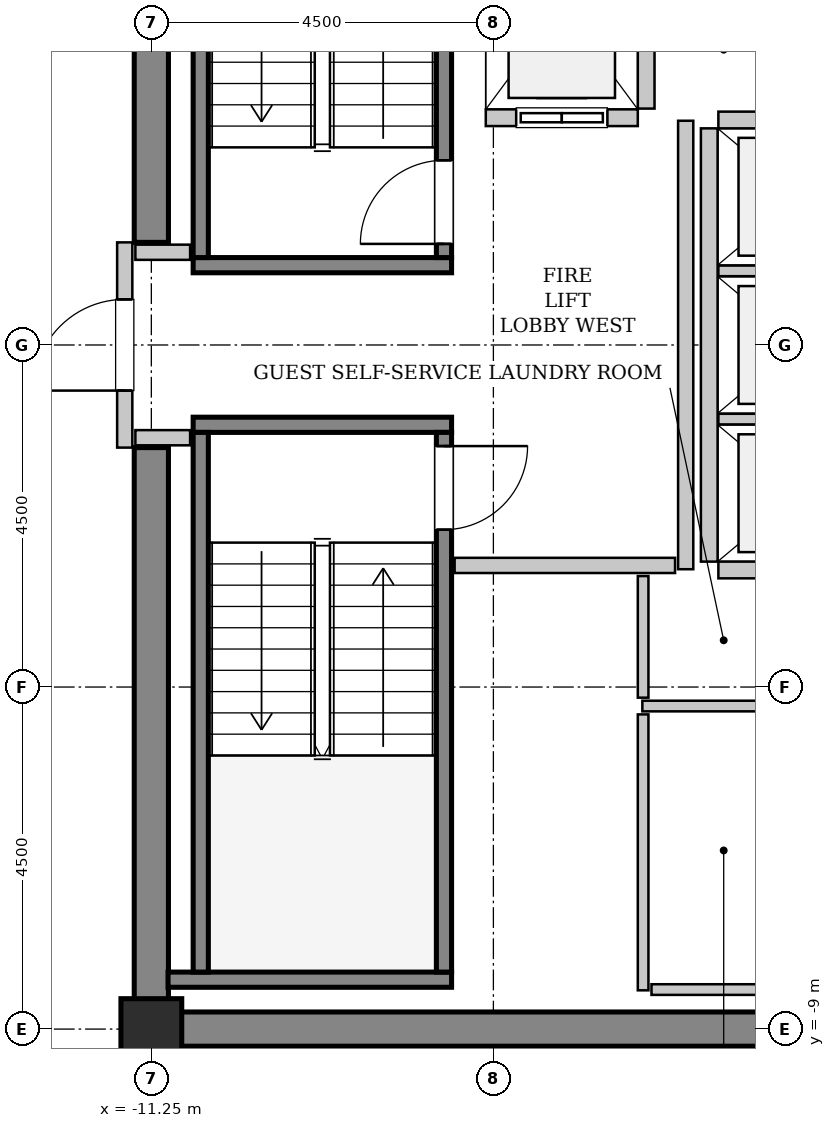
"""IFC4 building model, lengths in metres.
Left out: names, types, materials, properties, quantities, classifications, styles, units other than length and angle.
Written with IfcOpenShell. Run it as: python <this file> out.ifc"""

import sys

from ifc_helpers import new_model, si_unit, direction, frame, frame_2d, origin, origin_2d, place, context, subcontext, project, spatial, rectangle, hollow_rectangle, extrude, source, transform, mapped, element, fill, save


model = new_model("IFC4")
c1 = context("Model", 3, precision=1e-05, world=origin(), true_north=direction((0.0, 1.0)))
c2 = subcontext(c1, "Body", "Model", "MODEL_VIEW")
j1 = project(units=[si_unit("LENGTHUNIT", "METRE"), si_unit("PLANEANGLEUNIT", "RADIAN")], contexts=[c1])
p1 = place(None, origin())
s1 = spatial("IfcSite", under=j1, at=p1, CompositionType="ELEMENT")
p2 = place(p1, origin())
s2 = spatial("IfcBuilding", under=s1, at=p2, CompositionType="ELEMENT")
p3 = place(p2, frame((0.0, 0.0, 298.8)))
s3 = spatial("IfcBuildingStorey", under=s2, at=p3, CompositionType="ELEMENT", Elevation=298.8)
m1 = source(origin(), c2, "Body", "SweptSolid", [
    extrude(rectangle(XDim=9.925, YDim=0.45, at=frame_2d((4.962, 0.0))), origin(), (0.0, 0.0, 1.0), 3.8),
])
p4 = place(p3, frame((-11.475, -9.0, 0.0), z_axis=(0.0, 0.0, 1.0), x_axis=(1.0, 0.0, 0.0)))
e1 = element("IfcWall", 1, at=p4, inside=s3, PredefinedType="SHEAR", context=c2, shape_type="MappedRepresentation", body=[
    mapped(m1, transform((0.0, 0.0, 0.0), x_axis=(1.0, 0.0, 0.0), y_axis=(0.0, 1.0, 0.0), z_axis=(0.0, 0.0, 1.0), scale=1.0)),
])
m2 = source(origin(), c2, "Body", "SweptSolid", [
    extrude(rectangle(XDim=7.425, YDim=0.45, at=frame_2d((3.712, 0.0))), origin(), (0.0, 0.0, 1.0), 3.8),
])
for number, where, z_axis, x_axis in (
    (2, (-11.25, -8.775, 0.0), (0.0, 0.0, 1.0), (0.0, 1.0, 0.0)),
    (3, (-11.25, 1.35, 0.0), (0.0, 0.0, 1.0), (0.0, 1.0, 0.0)),
):
    element("IfcWall", number, at=place(p3, frame(where, z_axis=z_axis, x_axis=x_axis)), inside=s3, PredefinedType="SHEAR", context=c2, shape_type="MappedRepresentation", body=[
        mapped(m2, transform((0.0, 0.0, 0.0), x_axis=(1.0, 0.0, 0.0), y_axis=(0.0, 1.0, 0.0), z_axis=(0.0, 0.0, 1.0), scale=1.0)),
    ])
m3 = source(origin(), c2, "Body", "SweptSolid", [
    extrude(hollow_rectangle(XDim=0.8, YDim=0.8, WallThickness=0.04, InnerFilletRadius=0.04, OuterFilletRadius=0.08, at=origin_2d()), origin(), (0.0, 0.0, 1.0), 3.8),
])
p5 = place(p3, frame((-11.25, -9.0, 0.0), z_axis=(0.0, 0.0, 1.0), x_axis=(1.0, 0.0, 0.0)))
e4 = element("IfcColumn", 4, at=p5, inside=s3, PredefinedType="COLUMN", context=c2, shape_type="MappedRepresentation", body=[
    mapped(m3, transform((0.0, 0.0, 0.0), x_axis=(1.0, 0.0, 0.0), y_axis=(0.0, 1.0, 0.0), z_axis=(0.0, 0.0, 1.0), scale=1.0)),
])
m4 = source(origin(), c2, "Body", "SweptSolid", [
    extrude(rectangle(XDim=3.4, YDim=0.2, at=frame_2d((1.7, 0.0))), origin(), (0.0, 0.0, 1.0), 3.8),
])
p6 = place(p3, frame((-7.3, 1.05, 0.0), z_axis=(0.0, 0.0, 1.0), x_axis=(-1.0, 0.0, 0.0)))
e5 = element("IfcWall", 5, at=p6, inside=s3, PredefinedType="SOLIDWALL", context=c2, shape_type="MappedRepresentation", body=[
    mapped(m4, transform((0.0, 0.0, 0.0), x_axis=(1.0, 0.0, 0.0), y_axis=(0.0, 1.0, 0.0), z_axis=(0.0, 0.0, 1.0), scale=1.0)),
])
m5 = source(origin(), c2, "Body", "SweptSolid", [
    extrude(rectangle(XDim=7.1, YDim=0.2, at=frame_2d((3.55, 0.0))), origin(), (0.0, 0.0, 1.0), 3.8),
])
p7 = place(p3, frame((-7.4, 1.15, 0.0), z_axis=(0.0, 0.0, 1.0), x_axis=(0.0, 1.0, 0.0)))
e6 = element("IfcWall", 6, at=p7, inside=s3, PredefinedType="SOLIDWALL", context=c2, shape_type="MappedRepresentation", body=[
    mapped(m5, transform((0.0, 0.0, 0.0), x_axis=(1.0, 0.0, 0.0), y_axis=(0.0, 1.0, 0.0), z_axis=(0.0, 0.0, 1.0), scale=1.0)),
])
p8 = place(p7, frame((0.18, 0.0, 0.0)))
e7 = element("IfcOpeningElement", 7, at=p8, cuts=e6, PredefinedType="OPENING", context=c2, shape_type="SweptSolid", body=[
    extrude(rectangle(XDim=1.1, YDim=2.15, at=frame_2d((0.55, 1.075))), frame((0.0, 0.11, 0.0), z_axis=(0.0, -1.0, 0.0), x_axis=(1.0, 0.0, 0.0)), (0.0, 0.0, 1.0), 0.22),
])
p9 = place(p3, frame((-10.6, 1.15, 0.0), z_axis=(0.0, 0.0, 1.0), x_axis=(0.0, 1.0, 0.0)))
e8 = element("IfcWall", 8, at=p9, inside=s3, PredefinedType="SOLIDWALL", context=c2, shape_type="MappedRepresentation", body=[
    mapped(m5, transform((0.0, 0.0, 0.0), x_axis=(1.0, 0.0, 0.0), y_axis=(0.0, 1.0, 0.0), z_axis=(0.0, 0.0, 1.0), scale=1.0)),
])
p10 = place(p3, frame((-10.7, -1.05, 0.0), z_axis=(0.0, 0.0, 1.0), x_axis=(1.0, 0.0, 0.0)))
e9 = element("IfcWall", 9, at=p10, inside=s3, PredefinedType="SOLIDWALL", context=c2, shape_type="MappedRepresentation", body=[
    mapped(m4, transform((0.0, 0.0, 0.0), x_axis=(1.0, 0.0, 0.0), y_axis=(0.0, 1.0, 0.0), z_axis=(0.0, 0.0, 1.0), scale=1.0)),
])
m6 = source(origin(), c2, "Body", "SweptSolid", [
    extrude(rectangle(XDim=3.73, YDim=0.2, at=frame_2d((1.865, 0.0))), origin(), (0.0, 0.0, 1.0), 3.8),
])
p11 = place(p3, frame((-11.03, -8.35, 0.0), z_axis=(0.0, 0.0, 1.0), x_axis=(1.0, 0.0, 0.0)))
e10 = element("IfcWall", 10, at=p11, inside=s3, PredefinedType="SOLIDWALL", context=c2, shape_type="MappedRepresentation", body=[
    mapped(m6, transform((0.0, 0.0, 0.0), x_axis=(1.0, 0.0, 0.0), y_axis=(0.0, 1.0, 0.0), z_axis=(0.0, 0.0, 1.0), scale=1.0)),
])
p12 = place(p3, frame((-10.6, -1.15, 0.0), z_axis=(0.0, 0.0, 1.0), x_axis=(0.0, -1.0, 0.0)))
e11 = element("IfcWall", 11, at=p12, inside=s3, PredefinedType="SOLIDWALL", context=c2, shape_type="MappedRepresentation", body=[
    mapped(m5, transform((0.0, 0.0, 0.0), x_axis=(1.0, 0.0, 0.0), y_axis=(0.0, 1.0, 0.0), z_axis=(0.0, 0.0, 1.0), scale=1.0)),
])
p13 = place(p3, frame((-7.4, -1.15, 0.0), z_axis=(0.0, 0.0, 1.0), x_axis=(0.0, -1.0, 0.0)))
e12 = element("IfcWall", 12, at=p13, inside=s3, PredefinedType="SOLIDWALL", context=c2, shape_type="MappedRepresentation", body=[
    mapped(m5, transform((0.0, 0.0, 0.0), x_axis=(1.0, 0.0, 0.0), y_axis=(0.0, 1.0, 0.0), z_axis=(0.0, 0.0, 1.0), scale=1.0)),
])
p14 = place(p13, frame((0.18, 0.0, 0.0)))
e13 = element("IfcOpeningElement", 13, at=p14, cuts=e12, PredefinedType="OPENING", context=c2, shape_type="SweptSolid", body=[
    extrude(rectangle(XDim=1.1, YDim=2.15, at=frame_2d((0.55, 1.075))), frame((0.0, 0.11, 0.0), z_axis=(0.0, -1.0, 0.0), x_axis=(1.0, 0.0, 0.0)), (0.0, 0.0, 1.0), 0.22),
])
m7 = source(origin(), c2, "Body", "SweptSolid", [
    extrude(rectangle(XDim=2.0, YDim=0.22, at=frame_2d((1.0, 0.0))), origin(), (0.0, 0.0, 1.0), 3.535),
])
p15 = place(p3, frame((-6.85, 2.99, 0.0), z_axis=(0.0, 0.0, 1.0), x_axis=(1.0, 0.0, 0.0)))
e14 = element("IfcWall", 14, at=p15, inside=s3, PredefinedType="SOLIDWALL", context=c2, shape_type="MappedRepresentation", body=[
    mapped(m7, transform((0.0, 0.0, 0.0), x_axis=(1.0, 0.0, 0.0), y_axis=(0.0, 1.0, 0.0), z_axis=(0.0, 0.0, 1.0), scale=1.0)),
])
p16 = place(p15, frame((0.4, 0.0, 0.0)))
e15 = element("IfcOpeningElement", 15, at=p16, cuts=e14, PredefinedType="OPENING", context=c2, shape_type="SweptSolid", body=[
    extrude(rectangle(XDim=1.2, YDim=2.2, at=frame_2d((0.6, 1.1))), frame((0.0, 0.12, 0.0), z_axis=(0.0, -1.0, 0.0), x_axis=(1.0, 0.0, 0.0)), (0.0, 0.0, 1.0), 0.24),
])
m8 = source(origin(), c2, "Body", "SweptSolid", [
    extrude(rectangle(XDim=2.68, YDim=0.22, at=frame_2d((1.34, 0.0))), origin(), (0.0, 0.0, 1.0), 3.535),
])
p17 = place(p3, frame((-4.74, 3.11, 0.0), z_axis=(0.0, 0.0, 1.0), x_axis=(0.0, 1.0, 0.0)))
e16 = element("IfcWall", 16, at=p17, inside=s3, PredefinedType="SOLIDWALL", context=c2, shape_type="MappedRepresentation", body=[
    mapped(m8, transform((0.0, 0.0, 0.0), x_axis=(1.0, 0.0, 0.0), y_axis=(0.0, 1.0, 0.0), z_axis=(0.0, 0.0, 1.0), scale=1.0)),
])
m9 = source(origin(), c2, "Body", "SweptSolid", [
    extrude(rectangle(XDim=5.7, YDim=0.22, at=frame_2d((2.85, 0.0))), origin(), (0.0, 0.0, 1.0), 3.535),
])
p18 = place(p3, frame((-3.91, 2.85, 0.0), z_axis=(0.0, 0.0, 1.0), x_axis=(0.0, -1.0, 0.0)))
e17 = element("IfcWall", 17, at=p18, inside=s3, PredefinedType="SOLIDWALL", context=c2, shape_type="MappedRepresentation", body=[
    mapped(m9, transform((0.0, 0.0, 0.0), x_axis=(1.0, 0.0, 0.0), y_axis=(0.0, 1.0, 0.0), z_axis=(0.0, 0.0, 1.0), scale=1.0)),
])
m10 = source(origin(), c2, "Body", "SweptSolid", [
    extrude(rectangle(XDim=2.13, YDim=0.22, at=frame_2d((1.065, 0.0))), origin(), (0.0, 0.0, 1.0), 3.535),
])
p19 = place(p3, frame((-3.79, -2.96, 0.0), z_axis=(0.0, 0.0, 1.0), x_axis=(1.0, 0.0, 0.0)))
e18 = element("IfcWall", 18, at=p19, inside=s3, PredefinedType="SOLIDWALL", context=c2, shape_type="MappedRepresentation", body=[
    mapped(m10, transform((0.0, 0.0, 0.0), x_axis=(1.0, 0.0, 0.0), y_axis=(0.0, 1.0, 0.0), z_axis=(0.0, 0.0, 1.0), scale=1.0)),
])
m11 = source(origin(), c2, "Body", "SweptSolid", [
    extrude(rectangle(XDim=2.13, YDim=0.14, at=frame_2d((1.065, 0.0))), origin(), (0.0, 0.0, 1.0), 3.535),
])
for number, where, z_axis, x_axis in (
    (19, (-3.79, -0.975, 0.0), (0.0, 0.0, 1.0), (1.0, 0.0, 0.0)),
    (20, (-3.79, 0.975, 0.0), (0.0, 0.0, 1.0), (1.0, 0.0, 0.0)),
):
    element("IfcWall", number, at=place(p3, frame(where, z_axis=z_axis, x_axis=x_axis)), inside=s3, PredefinedType="PARTITIONING", context=c2, shape_type="MappedRepresentation", body=[
        mapped(m11, transform((0.0, 0.0, 0.0), x_axis=(1.0, 0.0, 0.0), y_axis=(0.0, 1.0, 0.0), z_axis=(0.0, 0.0, 1.0), scale=1.0)),
    ])
p20 = place(p3, frame((-1.66, 2.96, 0.0), z_axis=(0.0, 0.0, 1.0), x_axis=(-1.0, 0.0, 0.0)))
e21 = element("IfcWall", 21, at=p20, inside=s3, PredefinedType="SOLIDWALL", context=c2, shape_type="MappedRepresentation", body=[
    mapped(m10, transform((0.0, 0.0, 0.0), x_axis=(1.0, 0.0, 0.0), y_axis=(0.0, 1.0, 0.0), z_axis=(0.0, 0.0, 1.0), scale=1.0)),
])
m12 = source(origin(), c2, "Body", "SweptSolid", [
    extrude(rectangle(XDim=2.7, YDim=0.2, at=frame_2d((1.35, 0.0))), origin(), (0.0, 0.0, 1.0), 2.625),
])
p21 = place(p3, frame((-11.6, -1.35, 0.0), z_axis=(0.0, 0.0, 1.0), x_axis=(0.0, 1.0, 0.0)))
e22 = element("IfcWall", 22, at=p21, inside=s3, PredefinedType="PARTITIONING", context=c2, shape_type="MappedRepresentation", body=[
    mapped(m12, transform((0.0, 0.0, 0.0), x_axis=(1.0, 0.0, 0.0), y_axis=(0.0, 1.0, 0.0), z_axis=(0.0, 0.0, 1.0), scale=1.0)),
])
p22 = place(p21, frame((0.75, 0.0, 0.0)))
e23 = element("IfcOpeningElement", 23, at=p22, cuts=e22, PredefinedType="OPENING", context=c2, shape_type="SweptSolid", body=[
    extrude(rectangle(XDim=1.2, YDim=2.15, at=frame_2d((0.6, 1.075))), frame((0.0, 0.11, 0.0), z_axis=(0.0, -1.0, 0.0), x_axis=(1.0, 0.0, 0.0)), (0.0, 0.0, 1.0), 0.22),
])
m13 = source(origin(), c2, "Body", "SweptSolid", [
    extrude(rectangle(XDim=5.9, YDim=0.2, at=frame_2d((2.95, 0.0))), origin(), (0.0, 0.0, 1.0), 3.535),
])
p23 = place(p3, frame((-4.22, -2.95, 0.0), z_axis=(0.0, 0.0, 1.0), x_axis=(0.0, 1.0, 0.0)))
e24 = element("IfcWall", 24, at=p23, inside=s3, PredefinedType="PARTITIONING", context=c2, shape_type="MappedRepresentation", body=[
    mapped(m13, transform((0.0, 0.0, 0.0), x_axis=(1.0, 0.0, 0.0), y_axis=(0.0, 1.0, 0.0), z_axis=(0.0, 0.0, 1.0), scale=1.0)),
])
m14 = source(origin(), c2, "Body", "SweptSolid", [
    extrude(rectangle(XDim=2.9, YDim=0.2, at=frame_2d((1.45, 0.0))), origin(), (0.0, 0.0, 1.0), 3.535),
])
p24 = place(p3, frame((-7.26, -2.9, 0.0), z_axis=(0.0, 0.0, 1.0), x_axis=(1.0, 0.0, 0.0)))
e25 = element("IfcWall", 25, at=p24, inside=s3, PredefinedType="PARTITIONING", context=c2, shape_type="MappedRepresentation", body=[
    mapped(m14, transform((0.0, 0.0, 0.0), x_axis=(1.0, 0.0, 0.0), y_axis=(0.0, 1.0, 0.0), z_axis=(0.0, 0.0, 1.0), scale=1.0)),
])
m15 = source(origin(), c2, "Body", "SweptSolid", [
    extrude(rectangle(XDim=0.72, YDim=0.2, at=frame_2d((0.36, 0.0))), origin(), (0.0, 0.0, 1.0), 3.535),
])
for number, where, z_axis, x_axis in (
    (26, (-11.46, 1.22, 0.0), (0.0, 0.0, 1.0), (1.0, 0.0, 0.0)),
    (27, (-11.46, -1.22, 0.0), (0.0, 0.0, 1.0), (1.0, 0.0, 0.0)),
):
    element("IfcWall", number, at=place(p3, frame(where, z_axis=z_axis, x_axis=x_axis)), inside=s3, PredefinedType="PARTITIONING", context=c2, shape_type="MappedRepresentation", body=[
        mapped(m15, transform((0.0, 0.0, 0.0), x_axis=(1.0, 0.0, 0.0), y_axis=(0.0, 1.0, 0.0), z_axis=(0.0, 0.0, 1.0), scale=1.0)),
    ])
m16 = source(origin(), c2, "Body", "SweptSolid", [
    extrude(rectangle(XDim=3.15, YDim=0.14, at=frame_2d((1.575, 0.0))), origin(), (0.0, 0.0, 1.0), 3.535),
])
p25 = place(p3, frame((-4.79, -4.75, 0.0), z_axis=(0.0, 0.0, 1.0), x_axis=(1.0, 0.0, 0.0)))
e28 = element("IfcWall", 28, at=p25, inside=s3, PredefinedType="PARTITIONING", context=c2, shape_type="MappedRepresentation", body=[
    mapped(m16, transform((0.0, 0.0, 0.0), x_axis=(1.0, 0.0, 0.0), y_axis=(0.0, 1.0, 0.0), z_axis=(0.0, 0.0, 1.0), scale=1.0)),
])
m17 = source(origin(), c2, "Body", "SweptSolid", [
    extrude(rectangle(XDim=1.6, YDim=0.14, at=frame_2d((0.8, 0.0))), origin(), (0.0, 0.0, 1.0), 3.535),
])
p26 = place(p3, frame((-4.78, -4.64, 0.0), z_axis=(0.0, 0.0, 1.0), x_axis=(0.0, 1.0, 0.0)))
e29 = element("IfcWall", 29, at=p26, inside=s3, PredefinedType="PARTITIONING", context=c2, shape_type="MappedRepresentation", body=[
    mapped(m17, transform((0.0, 0.0, 0.0), x_axis=(1.0, 0.0, 0.0), y_axis=(0.0, 1.0, 0.0), z_axis=(0.0, 0.0, 1.0), scale=1.0)),
])
m18 = source(origin(), c2, "Body", "SweptSolid", [
    extrude(rectangle(XDim=3.63, YDim=0.14, at=frame_2d((1.815, 0.0))), origin(), (0.0, 0.0, 1.0), 3.535),
])
p27 = place(p3, frame((-4.78, -8.49, 0.0), z_axis=(0.0, 0.0, 1.0), x_axis=(0.0, 1.0, 0.0)))
e30 = element("IfcWall", 30, at=p27, inside=s3, PredefinedType="PARTITIONING", context=c2, shape_type="MappedRepresentation", body=[
    mapped(m18, transform((0.0, 0.0, 0.0), x_axis=(1.0, 0.0, 0.0), y_axis=(0.0, 1.0, 0.0), z_axis=(0.0, 0.0, 1.0), scale=1.0)),
])
m19 = source(origin(), c2, "Body", "SweptSolid", [
    extrude(rectangle(XDim=3.03, YDim=0.14, at=frame_2d((1.515, 0.0))), origin(), (0.0, 0.0, 1.0), 3.535),
])
p28 = place(p3, frame((-4.67, -8.48, 0.0), z_axis=(0.0, 0.0, 1.0), x_axis=(1.0, 0.0, 0.0)))
e31 = element("IfcWall", 31, at=p28, inside=s3, PredefinedType="PARTITIONING", context=c2, shape_type="MappedRepresentation", body=[
    mapped(m19, transform((0.0, 0.0, 0.0), x_axis=(1.0, 0.0, 0.0), y_axis=(0.0, 1.0, 0.0), z_axis=(0.0, 0.0, 1.0), scale=1.0)),
])
m20 = source(origin(), c2, "Body", "SweptSolid", [
    extrude(rectangle(XDim=1.1, YDim=2.15, at=frame_2d((0.55, 1.075))), frame((0.0, 0.025, 0.0), z_axis=(0.0, -1.0, 0.0), x_axis=(1.0, 0.0, 0.0)), (0.0, 0.0, 1.0), 0.05),
])
p29 = place(p8, origin())
e32 = element("IfcDoor", 32, at=p29, inside=s3, OperationType="SINGLE_SWING_LEFT", PredefinedType="DOOR", context=c2, shape_type="MappedRepresentation", body=[
    mapped(m20, transform((0.0, 0.0, 0.0), x_axis=(1.0, 0.0, 0.0), y_axis=(0.0, 1.0, 0.0), z_axis=(0.0, 0.0, 1.0), scale=1.0)),
])
fill(e7, e32)
p30 = place(p14, origin())
e33 = element("IfcDoor", 33, at=p30, inside=s3, OperationType="SINGLE_SWING_LEFT", PredefinedType="DOOR", context=c2, shape_type="MappedRepresentation", body=[
    mapped(m20, transform((0.0, 0.0, 0.0), x_axis=(1.0, 0.0, 0.0), y_axis=(0.0, 1.0, 0.0), z_axis=(0.0, 0.0, 1.0), scale=1.0)),
])
fill(e13, e33)
m21 = source(origin(), c2, "Body", "SweptSolid", [
    extrude(rectangle(XDim=1.2, YDim=2.2, at=frame_2d((0.6, 1.1))), frame((0.0, 0.025, 0.0), z_axis=(0.0, -1.0, 0.0), x_axis=(1.0, 0.0, 0.0)), (0.0, 0.0, 1.0), 0.05),
])
p31 = place(p16, origin())
e34 = element("IfcDoor", 34, at=p31, inside=s3, OperationType="SLIDING_TO_LEFT", PredefinedType="DOOR", context=c2, shape_type="MappedRepresentation", body=[
    mapped(m21, transform((0.0, 0.0, 0.0), x_axis=(1.0, 0.0, 0.0), y_axis=(0.0, 1.0, 0.0), z_axis=(0.0, 0.0, 1.0), scale=1.0)),
])
fill(e15, e34)
m22 = source(origin(), c2, "Body", "SweptSolid", [
    extrude(rectangle(XDim=1.2, YDim=2.15, at=frame_2d((0.6, 1.075))), frame((0.0, 0.025, 0.0), z_axis=(0.0, -1.0, 0.0), x_axis=(1.0, 0.0, 0.0)), (0.0, 0.0, 1.0), 0.05),
])
p32 = place(p22, origin())
e35 = element("IfcDoor", 35, at=p32, inside=s3, OperationType="SINGLE_SWING_LEFT", PredefinedType="DOOR", context=c2, shape_type="MappedRepresentation", body=[
    mapped(m22, transform((0.0, 0.0, 0.0), x_axis=(1.0, 0.0, 0.0), y_axis=(0.0, 1.0, 0.0), z_axis=(0.0, 0.0, 1.0), scale=1.0)),
])
fill(e23, e35)
save(model, sys.argv[1])
